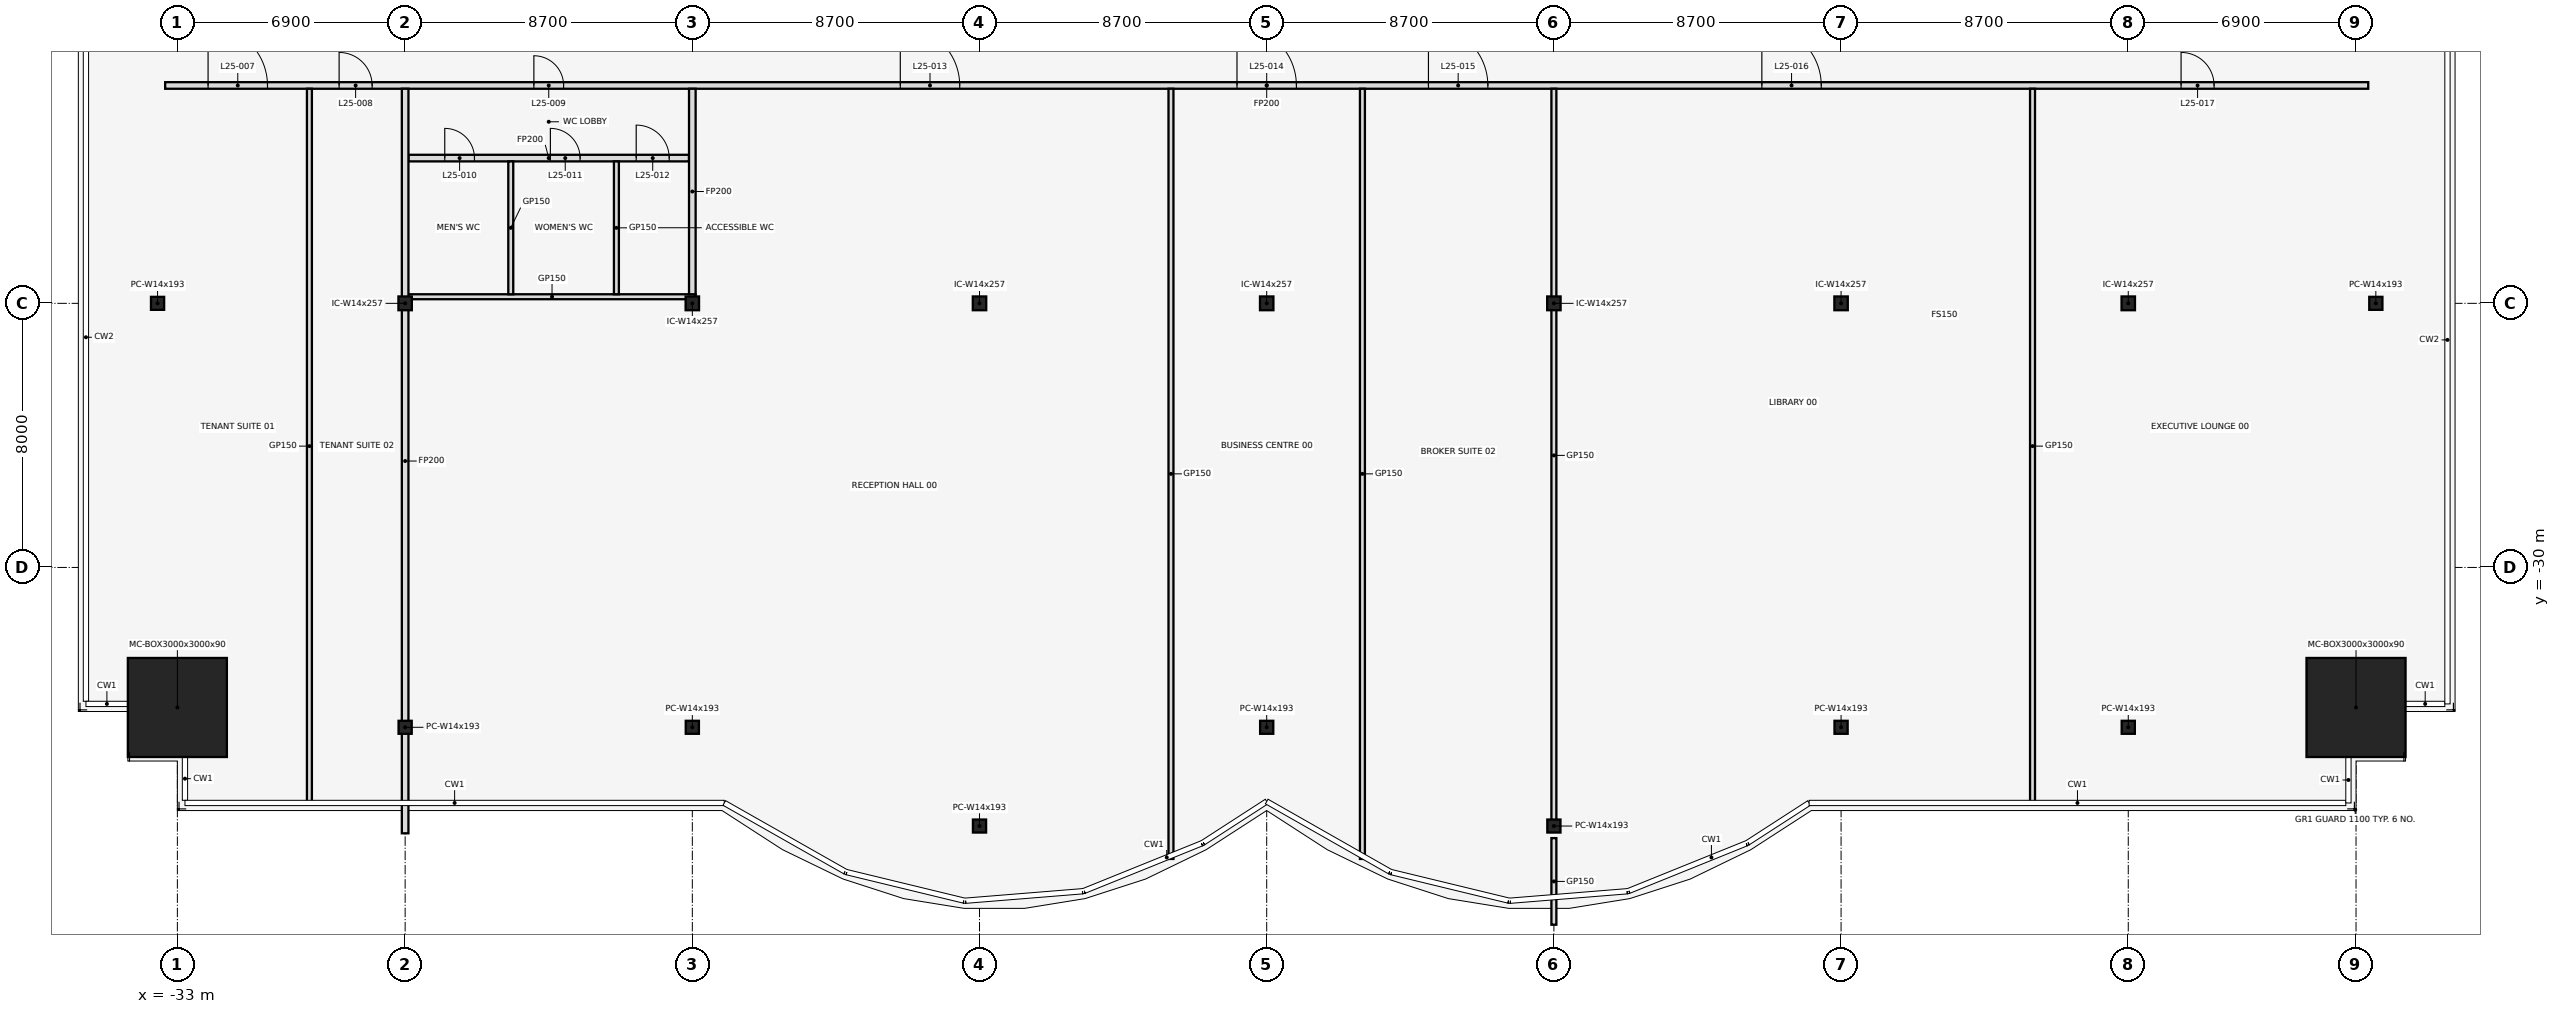
"""IFC4 building model, lengths in metres.
Left out: names, types, materials, properties, quantities, classifications, styles, units other than length and angle.
Written with IfcOpenShell. Run it as: python <this file> out.ifc"""

import sys

from ifc_helpers import new_model, si_unit, direction, frame, frame_2d, origin, origin_2d, place, context, subcontext, project, spatial, rectangle, hollow_rectangle, i_section, extrude, element, fill, save


model = new_model("IFC4")
c1 = context("Model", 3, precision=1e-05, world=origin(), true_north=direction((0.0, 1.0)))
c2 = subcontext(c1, "Body", "Model", "MODEL_VIEW")
j1 = project(units=[si_unit("LENGTHUNIT", "METRE"), si_unit("PLANEANGLEUNIT", "RADIAN")], contexts=[c1])
p1 = place(None, origin())
s1 = spatial("IfcSite", under=j1, at=p1, CompositionType="ELEMENT")
p2 = place(p1, origin())
s2 = spatial("IfcBuilding", under=s1, at=p2, CompositionType="ELEMENT")
p3 = place(p2, frame((0.0, 0.0, 118.6)))
s3 = spatial("IfcBuildingStorey", under=s2, at=p3, CompositionType="ELEMENT", Elevation=118.6)
p4 = place(p3, frame((-33.0, -34.242, 0.0), z_axis=(0.0, 0.0, 1.0), x_axis=(1.0, 0.0, 0.0)))
e1 = element("IfcColumn", 1, at=p4, inside=s3, PredefinedType="COLUMN", context=c2, shape_type="SweptSolid", body=[
    extrude(hollow_rectangle(XDim=3.0, YDim=3.0, WallThickness=0.09, at=origin_2d()), origin(), (0.0, 0.0, 1.0), 4.1),
])
for number, where, z_axis, x_axis in (
    (2, (-26.1, -34.842, 0.0), (0.0, 0.0, 1.0), (1.0, 0.0, 0.0)),
    (3, (-17.4, -34.842, 0.0), (0.0, 0.0, 1.0), (1.0, 0.0, 0.0)),
    (4, (-8.7, -37.833, 0.0), (0.0, 0.0, 1.0), (1.0, 0.0, 0.0)),
    (5, (0.0, -34.842, 0.0), (0.0, 0.0, 1.0), (1.0, 0.0, 0.0)),
    (6, (8.7, -37.833, 0.0), (0.0, 0.0, 1.0), (1.0, 0.0, 0.0)),
    (7, (17.4, -34.842, 0.0), (0.0, 0.0, 1.0), (1.0, 0.0, 0.0)),
    (8, (26.1, -34.842, 0.0), (0.0, 0.0, 1.0), (1.0, 0.0, 0.0)),
):
    element("IfcColumn", number, at=place(p3, frame(where, z_axis=z_axis, x_axis=x_axis)), inside=s3, PredefinedType="COLUMN", context=c2, shape_type="SweptSolid", body=[
        extrude(i_section(OverallWidth=0.399, OverallDepth=0.394, WebThickness=0.023, FlangeThickness=0.037, at=origin_2d()), origin(), (0.0, 0.0, 1.0), 4.1),
    ])
p5 = place(p3, frame((33.0, -34.242, 0.0), z_axis=(0.0, 0.0, 1.0), x_axis=(1.0, 0.0, 0.0)))
e9 = element("IfcColumn", 9, at=p5, inside=s3, PredefinedType="COLUMN", context=c2, shape_type="SweptSolid", body=[
    extrude(hollow_rectangle(XDim=3.0, YDim=3.0, WallThickness=0.09, at=origin_2d()), origin(), (0.0, 0.0, 1.0), 4.1),
])
for number, where, z_axis, x_axis in (
    (10, (-33.6, -22.0, 0.0), (0.0, 0.0, 1.0), (1.0, 0.0, 0.0)),
    (11, (33.6, -22.0, 0.0), (0.0, 0.0, 1.0), (1.0, 0.0, 0.0)),
):
    element("IfcColumn", number, at=place(p3, frame(where, z_axis=z_axis, x_axis=x_axis)), inside=s3, PredefinedType="COLUMN", context=c2, shape_type="SweptSolid", body=[
        extrude(i_section(OverallWidth=0.399, OverallDepth=0.394, WebThickness=0.023, FlangeThickness=0.037, at=origin_2d()), origin(), (0.0, 0.0, 1.0), 4.1),
    ])
for number, where, z_axis, x_axis in (
    (12, (-26.1, -22.0, 0.0), (0.0, 0.0, 1.0), (1.0, 0.0, 0.0)),
    (13, (-17.4, -22.0, 0.0), (0.0, 0.0, 1.0), (1.0, 0.0, 0.0)),
    (14, (-8.7, -22.0, 0.0), (0.0, 0.0, 1.0), (1.0, 0.0, 0.0)),
    (15, (0.0, -22.0, 0.0), (0.0, 0.0, 1.0), (1.0, 0.0, 0.0)),
    (16, (8.7, -22.0, 0.0), (0.0, 0.0, 1.0), (1.0, 0.0, 0.0)),
    (17, (17.4, -22.0, 0.0), (0.0, 0.0, 1.0), (1.0, 0.0, 0.0)),
    (18, (26.1, -22.0, 0.0), (0.0, 0.0, 1.0), (1.0, 0.0, 0.0)),
):
    element("IfcColumn", number, at=place(p3, frame(where, z_axis=z_axis, x_axis=x_axis)), inside=s3, PredefinedType="COLUMN", context=c2, shape_type="SweptSolid", body=[
        extrude(i_section(OverallWidth=0.406, OverallDepth=0.417, WebThickness=0.03, FlangeThickness=0.048, at=origin_2d()), origin(), (0.0, 0.0, 1.0), 4.1),
    ])
p6 = place(p3, frame((-26.0, -21.8, 0.0), z_axis=(0.0, 0.0, 1.0), x_axis=(1.0, 0.0, 0.0)))
e19 = element("IfcWall", 19, at=p6, inside=s3, PredefinedType="PARTITIONING", context=c2, shape_type="SweptSolid", body=[
    extrude(rectangle(XDim=8.7, YDim=0.15, at=frame_2d((4.35, 0.0))), origin(), (0.0, 0.0, 1.0), 3.018),
])
p7 = place(p3, frame((-26.0, -17.6, 0.0), z_axis=(0.0, 0.0, 1.0), x_axis=(1.0, 0.0, 0.0)))
e20 = element("IfcWall", 20, at=p7, inside=s3, PredefinedType="PARTITIONING", context=c2, shape_type="SweptSolid", body=[
    extrude(rectangle(XDim=8.5, YDim=0.2, at=frame_2d((4.25, 0.0))), origin(), (0.0, 0.0, 1.0), 3.018),
])
p8 = place(p7, frame((1.1, 0.0, 0.0)))
e21 = element("IfcOpeningElement", 21, at=p8, cuts=e20, PredefinedType="OPENING", context=c2, shape_type="SweptSolid", body=[
    extrude(rectangle(XDim=0.9, YDim=2.1, at=frame_2d((0.45, 1.05))), frame((0.0, 0.112, 0.0), z_axis=(0.0, -1.0, 0.0), x_axis=(1.0, 0.0, 0.0)), (0.0, 0.0, 1.0), 0.224),
])
p9 = place(p7, frame((4.3, 0.0, 0.0)))
e22 = element("IfcOpeningElement", 22, at=p9, cuts=e20, PredefinedType="OPENING", context=c2, shape_type="SweptSolid", body=[
    extrude(rectangle(XDim=0.9, YDim=2.1, at=frame_2d((0.45, 1.05))), frame((0.0, 0.112, 0.0), z_axis=(0.0, -1.0, 0.0), x_axis=(1.0, 0.0, 0.0)), (0.0, 0.0, 1.0), 0.224),
])
p10 = place(p7, frame((6.9, 0.0, 0.0)))
e23 = element("IfcOpeningElement", 23, at=p10, cuts=e20, PredefinedType="OPENING", context=c2, shape_type="SweptSolid", body=[
    extrude(rectangle(XDim=1.0, YDim=2.1, at=frame_2d((0.5, 1.05))), frame((0.0, 0.112, 0.0), z_axis=(0.0, -1.0, 0.0), x_axis=(1.0, 0.0, 0.0)), (0.0, 0.0, 1.0), 0.224),
])
p11 = place(p3, frame((-33.37, -15.4, 0.0), z_axis=(0.0, 0.0, 1.0), x_axis=(1.0, 0.0, 0.0)))
e24 = element("IfcWall", 24, at=p11, inside=s3, PredefinedType="PARTITIONING", context=c2, shape_type="SweptSolid", body=[
    extrude(rectangle(XDim=66.74, YDim=0.2, at=frame_2d((33.37, 0.0))), origin(), (0.0, 0.0, 1.0), 3.018),
])
p12 = place(p11, frame((1.3, 0.0, 0.0)))
e25 = element("IfcOpeningElement", 25, at=p12, cuts=e24, PredefinedType="OPENING", context=c2, shape_type="SweptSolid", body=[
    extrude(rectangle(XDim=1.8, YDim=2.1, at=frame_2d((0.9, 1.05))), frame((0.0, 0.112, 0.0), z_axis=(0.0, -1.0, 0.0), x_axis=(1.0, 0.0, 0.0)), (0.0, 0.0, 1.0), 0.224),
])
p13 = place(p11, frame((5.27, 0.0, 0.0)))
e26 = element("IfcOpeningElement", 26, at=p13, cuts=e24, PredefinedType="OPENING", context=c2, shape_type="SweptSolid", body=[
    extrude(rectangle(XDim=1.0, YDim=2.1, at=frame_2d((0.5, 1.05))), frame((0.0, 0.112, 0.0), z_axis=(0.0, -1.0, 0.0), x_axis=(1.0, 0.0, 0.0)), (0.0, 0.0, 1.0), 0.224),
])
p14 = place(p11, frame((11.17, 0.0, 0.0)))
e27 = element("IfcOpeningElement", 27, at=p14, cuts=e24, PredefinedType="OPENING", context=c2, shape_type="SweptSolid", body=[
    extrude(rectangle(XDim=0.9, YDim=2.1, at=frame_2d((0.45, 1.05))), frame((0.0, 0.112, 0.0), z_axis=(0.0, -1.0, 0.0), x_axis=(1.0, 0.0, 0.0)), (0.0, 0.0, 1.0), 0.224),
])
p15 = place(p11, frame((22.27, 0.0, 0.0)))
e28 = element("IfcOpeningElement", 28, at=p15, cuts=e24, PredefinedType="OPENING", context=c2, shape_type="SweptSolid", body=[
    extrude(rectangle(XDim=1.8, YDim=2.1, at=frame_2d((0.9, 1.05))), frame((0.0, 0.112, 0.0), z_axis=(0.0, -1.0, 0.0), x_axis=(1.0, 0.0, 0.0)), (0.0, 0.0, 1.0), 0.224),
])
p16 = place(p11, frame((32.47, 0.0, 0.0)))
e29 = element("IfcOpeningElement", 29, at=p16, cuts=e24, PredefinedType="OPENING", context=c2, shape_type="SweptSolid", body=[
    extrude(rectangle(XDim=1.8, YDim=2.1, at=frame_2d((0.9, 1.05))), frame((0.0, 0.112, 0.0), z_axis=(0.0, -1.0, 0.0), x_axis=(1.0, 0.0, 0.0)), (0.0, 0.0, 1.0), 0.224),
])
p17 = place(p11, frame((38.27, 0.0, 0.0)))
e30 = element("IfcOpeningElement", 30, at=p17, cuts=e24, PredefinedType="OPENING", context=c2, shape_type="SweptSolid", body=[
    extrude(rectangle(XDim=1.8, YDim=2.1, at=frame_2d((0.9, 1.05))), frame((0.0, 0.112, 0.0), z_axis=(0.0, -1.0, 0.0), x_axis=(1.0, 0.0, 0.0)), (0.0, 0.0, 1.0), 0.224),
])
p18 = place(p11, frame((48.37, 0.0, 0.0)))
e31 = element("IfcOpeningElement", 31, at=p18, cuts=e24, PredefinedType="OPENING", context=c2, shape_type="SweptSolid", body=[
    extrude(rectangle(XDim=1.8, YDim=2.1, at=frame_2d((0.9, 1.05))), frame((0.0, 0.112, 0.0), z_axis=(0.0, -1.0, 0.0), x_axis=(1.0, 0.0, 0.0)), (0.0, 0.0, 1.0), 0.224),
])
p19 = place(p11, frame((61.07, 0.0, 0.0)))
e32 = element("IfcOpeningElement", 32, at=p19, cuts=e24, PredefinedType="OPENING", context=c2, shape_type="SweptSolid", body=[
    extrude(rectangle(XDim=1.0, YDim=2.1, at=frame_2d((0.5, 1.05))), frame((0.0, 0.112, 0.0), z_axis=(0.0, -1.0, 0.0), x_axis=(1.0, 0.0, 0.0)), (0.0, 0.0, 1.0), 0.224),
])
p20 = place(p3, frame((-29.0, -37.15, 0.0), z_axis=(0.0, 0.0, 1.0), x_axis=(0.0, 1.0, 0.0)))
e33 = element("IfcWall", 33, at=p20, inside=s3, PredefinedType="PARTITIONING", context=c2, shape_type="SweptSolid", body=[
    extrude(rectangle(XDim=21.65, YDim=0.15, at=frame_2d((10.825, 0.0))), origin(), (0.0, 0.0, 1.0), 3.018),
])
p21 = place(p3, frame((-26.1, -38.053, 0.0), z_axis=(0.0, 0.0, 1.0), x_axis=(0.0, 1.0, 0.0)))
e34 = element("IfcWall", 34, at=p21, inside=s3, PredefinedType="PARTITIONING", context=c2, shape_type="SweptSolid", body=[
    extrude(rectangle(XDim=22.553, YDim=0.2, at=frame_2d((11.277, 0.0))), origin(), (0.0, 0.0, 1.0), 3.018),
])
for number, where, z_axis, x_axis in (
    (35, (-22.9, -21.725, 0.0), (0.0, 0.0, 1.0), (0.0, 1.0, 0.0)),
    (36, (-19.7, -21.725, 0.0), (0.0, 0.0, 1.0), (0.0, 1.0, 0.0)),
):
    element("IfcWall", number, at=place(p3, frame(where, z_axis=z_axis, x_axis=x_axis)), inside=s3, PredefinedType="PARTITIONING", context=c2, shape_type="SweptSolid", body=[
        extrude(rectangle(XDim=4.025, YDim=0.15, at=frame_2d((2.013, 0.0))), origin(), (0.0, 0.0, 1.0), 3.018),
    ])
p22 = place(p3, frame((-17.4, -21.725, 0.0), z_axis=(0.0, 0.0, 1.0), x_axis=(0.0, 1.0, 0.0)))
e37 = element("IfcWall", 37, at=p22, inside=s3, PredefinedType="PARTITIONING", context=c2, shape_type="SweptSolid", body=[
    extrude(rectangle(XDim=6.225, YDim=0.2, at=frame_2d((3.113, 0.0))), origin(), (0.0, 0.0, 1.0), 3.018),
])
for number, where, z_axis, x_axis in (
    (38, (-2.9, -38.83, 0.0), (0.0, 0.0, 1.0), (0.0, 1.0, 0.0)),
    (39, (2.9, -38.83, 0.0), (0.0, 0.0, 1.0), (0.0, 1.0, 0.0)),
):
    element("IfcWall", number, at=place(p3, frame(where, z_axis=z_axis, x_axis=x_axis)), inside=s3, PredefinedType="PARTITIONING", context=c2, shape_type="SweptSolid", body=[
        extrude(rectangle(XDim=23.33, YDim=0.15, at=frame_2d((11.665, 0.0))), origin(), (0.0, 0.0, 1.0), 3.018),
    ])
p23 = place(p3, frame((8.7, -40.823, 0.0), z_axis=(0.0, 0.0, 1.0), x_axis=(0.0, 1.0, 0.0)))
e40 = element("IfcWall", 40, at=p23, inside=s3, PredefinedType="PARTITIONING", context=c2, shape_type="SweptSolid", body=[
    extrude(rectangle(XDim=2.624, YDim=0.15, at=frame_2d((1.312, 0.0))), origin(), (0.0, 0.0, 1.0), 3.018),
])
p24 = place(p3, frame((8.7, -37.711, 0.0), z_axis=(0.0, 0.0, 1.0), x_axis=(0.0, 1.0, 0.0)))
e41 = element("IfcWall", 41, at=p24, inside=s3, PredefinedType="PARTITIONING", context=c2, shape_type="SweptSolid", body=[
    extrude(rectangle(XDim=22.211, YDim=0.15, at=frame_2d((11.105, 0.0))), origin(), (0.0, 0.0, 1.0), 3.018),
])
p25 = place(p3, frame((23.2, -37.15, 0.0), z_axis=(0.0, 0.0, 1.0), x_axis=(0.0, 1.0, 0.0)))
e42 = element("IfcWall", 42, at=p25, inside=s3, PredefinedType="PARTITIONING", context=c2, shape_type="SweptSolid", body=[
    extrude(rectangle(XDim=21.65, YDim=0.15, at=frame_2d((10.825, 0.0))), origin(), (0.0, 0.0, 1.0), 3.018),
])
p26 = place(p12, origin())
e43 = element("IfcDoor", 43, at=p26, inside=s3, OperationType="SINGLE_SWING_LEFT", PredefinedType="DOOR", context=c2, shape_type="SweptSolid", body=[
    extrude(rectangle(XDim=1.8, YDim=2.1, at=frame_2d((0.9, 1.05))), frame((0.0, 0.025, 0.0), z_axis=(0.0, -1.0, 0.0), x_axis=(1.0, 0.0, 0.0)), (0.0, 0.0, 1.0), 0.05),
])
fill(e25, e43)
p27 = place(p13, frame((1.0, 0.0, 0.0), z_axis=(0.0, 0.0, 1.0), x_axis=(-1.0, 0.0, 0.0)))
e44 = element("IfcDoor", 44, at=p27, inside=s3, OperationType="SINGLE_SWING_RIGHT", PredefinedType="DOOR", context=c2, shape_type="SweptSolid", body=[
    extrude(rectangle(XDim=1.0, YDim=2.1, at=frame_2d((0.5, 1.05))), frame((0.0, 0.025, 0.0), z_axis=(0.0, -1.0, 0.0), x_axis=(1.0, 0.0, 0.0)), (0.0, 0.0, 1.0), 0.05),
])
fill(e26, e44)
p28 = place(p14, frame((0.9, 0.0, 0.0), z_axis=(0.0, 0.0, 1.0), x_axis=(-1.0, 0.0, 0.0)))
e45 = element("IfcDoor", 45, at=p28, inside=s3, OperationType="SINGLE_SWING_RIGHT", PredefinedType="DOOR", context=c2, shape_type="SweptSolid", body=[
    extrude(rectangle(XDim=0.9, YDim=2.1, at=frame_2d((0.45, 1.05))), frame((0.0, 0.025, 0.0), z_axis=(0.0, -1.0, 0.0), x_axis=(1.0, 0.0, 0.0)), (0.0, 0.0, 1.0), 0.05),
])
fill(e27, e45)
p29 = place(p8, frame((0.9, 0.0, 0.0), z_axis=(0.0, 0.0, 1.0), x_axis=(-1.0, 0.0, 0.0)))
e46 = element("IfcDoor", 46, at=p29, inside=s3, OperationType="SINGLE_SWING_LEFT", PredefinedType="DOOR", context=c2, shape_type="SweptSolid", body=[
    extrude(rectangle(XDim=0.9, YDim=2.1, at=frame_2d((0.45, 1.05))), frame((0.0, 0.025, 0.0), z_axis=(0.0, -1.0, 0.0), x_axis=(1.0, 0.0, 0.0)), (0.0, 0.0, 1.0), 0.05),
])
fill(e21, e46)
p30 = place(p9, frame((0.9, 0.0, 0.0), z_axis=(0.0, 0.0, 1.0), x_axis=(-1.0, 0.0, 0.0)))
e47 = element("IfcDoor", 47, at=p30, inside=s3, OperationType="SINGLE_SWING_RIGHT", PredefinedType="DOOR", context=c2, shape_type="SweptSolid", body=[
    extrude(rectangle(XDim=0.9, YDim=2.1, at=frame_2d((0.45, 1.05))), frame((0.0, 0.025, 0.0), z_axis=(0.0, -1.0, 0.0), x_axis=(1.0, 0.0, 0.0)), (0.0, 0.0, 1.0), 0.05),
])
fill(e22, e47)
p31 = place(p10, frame((1.0, 0.0, 0.0), z_axis=(0.0, 0.0, 1.0), x_axis=(-1.0, 0.0, 0.0)))
e48 = element("IfcDoor", 48, at=p31, inside=s3, OperationType="SINGLE_SWING_RIGHT", PredefinedType="DOOR", context=c2, shape_type="SweptSolid", body=[
    extrude(rectangle(XDim=1.0, YDim=2.1, at=frame_2d((0.5, 1.05))), frame((0.0, 0.025, 0.0), z_axis=(0.0, -1.0, 0.0), x_axis=(1.0, 0.0, 0.0)), (0.0, 0.0, 1.0), 0.05),
])
fill(e23, e48)
p32 = place(p15, origin())
e49 = element("IfcDoor", 49, at=p32, inside=s3, OperationType="SINGLE_SWING_LEFT", PredefinedType="DOOR", context=c2, shape_type="SweptSolid", body=[
    extrude(rectangle(XDim=1.8, YDim=2.1, at=frame_2d((0.9, 1.05))), frame((0.0, 0.025, 0.0), z_axis=(0.0, -1.0, 0.0), x_axis=(1.0, 0.0, 0.0)), (0.0, 0.0, 1.0), 0.05),
])
fill(e28, e49)
p33 = place(p16, origin())
e50 = element("IfcDoor", 50, at=p33, inside=s3, OperationType="SINGLE_SWING_LEFT", PredefinedType="DOOR", context=c2, shape_type="SweptSolid", body=[
    extrude(rectangle(XDim=1.8, YDim=2.1, at=frame_2d((0.9, 1.05))), frame((0.0, 0.025, 0.0), z_axis=(0.0, -1.0, 0.0), x_axis=(1.0, 0.0, 0.0)), (0.0, 0.0, 1.0), 0.05),
])
fill(e29, e50)
p34 = place(p17, origin())
e51 = element("IfcDoor", 51, at=p34, inside=s3, OperationType="SINGLE_SWING_LEFT", PredefinedType="DOOR", context=c2, shape_type="SweptSolid", body=[
    extrude(rectangle(XDim=1.8, YDim=2.1, at=frame_2d((0.9, 1.05))), frame((0.0, 0.025, 0.0), z_axis=(0.0, -1.0, 0.0), x_axis=(1.0, 0.0, 0.0)), (0.0, 0.0, 1.0), 0.05),
])
fill(e30, e51)
p35 = place(p18, origin())
e52 = element("IfcDoor", 52, at=p35, inside=s3, OperationType="SINGLE_SWING_LEFT", PredefinedType="DOOR", context=c2, shape_type="SweptSolid", body=[
    extrude(rectangle(XDim=1.8, YDim=2.1, at=frame_2d((0.9, 1.05))), frame((0.0, 0.025, 0.0), z_axis=(0.0, -1.0, 0.0), x_axis=(1.0, 0.0, 0.0)), (0.0, 0.0, 1.0), 0.05),
])
fill(e31, e52)
p36 = place(p19, frame((1.0, 0.0, 0.0), z_axis=(0.0, 0.0, 1.0), x_axis=(-1.0, 0.0, 0.0)))
e53 = element("IfcDoor", 53, at=p36, inside=s3, OperationType="SINGLE_SWING_RIGHT", PredefinedType="DOOR", context=c2, shape_type="SweptSolid", body=[
    extrude(rectangle(XDim=1.0, YDim=2.1, at=frame_2d((0.5, 1.05))), frame((0.0, 0.025, 0.0), z_axis=(0.0, -1.0, 0.0), x_axis=(1.0, 0.0, 0.0)), (0.0, 0.0, 1.0), 0.05),
])
fill(e32, e53)
save(model, sys.argv[1])
